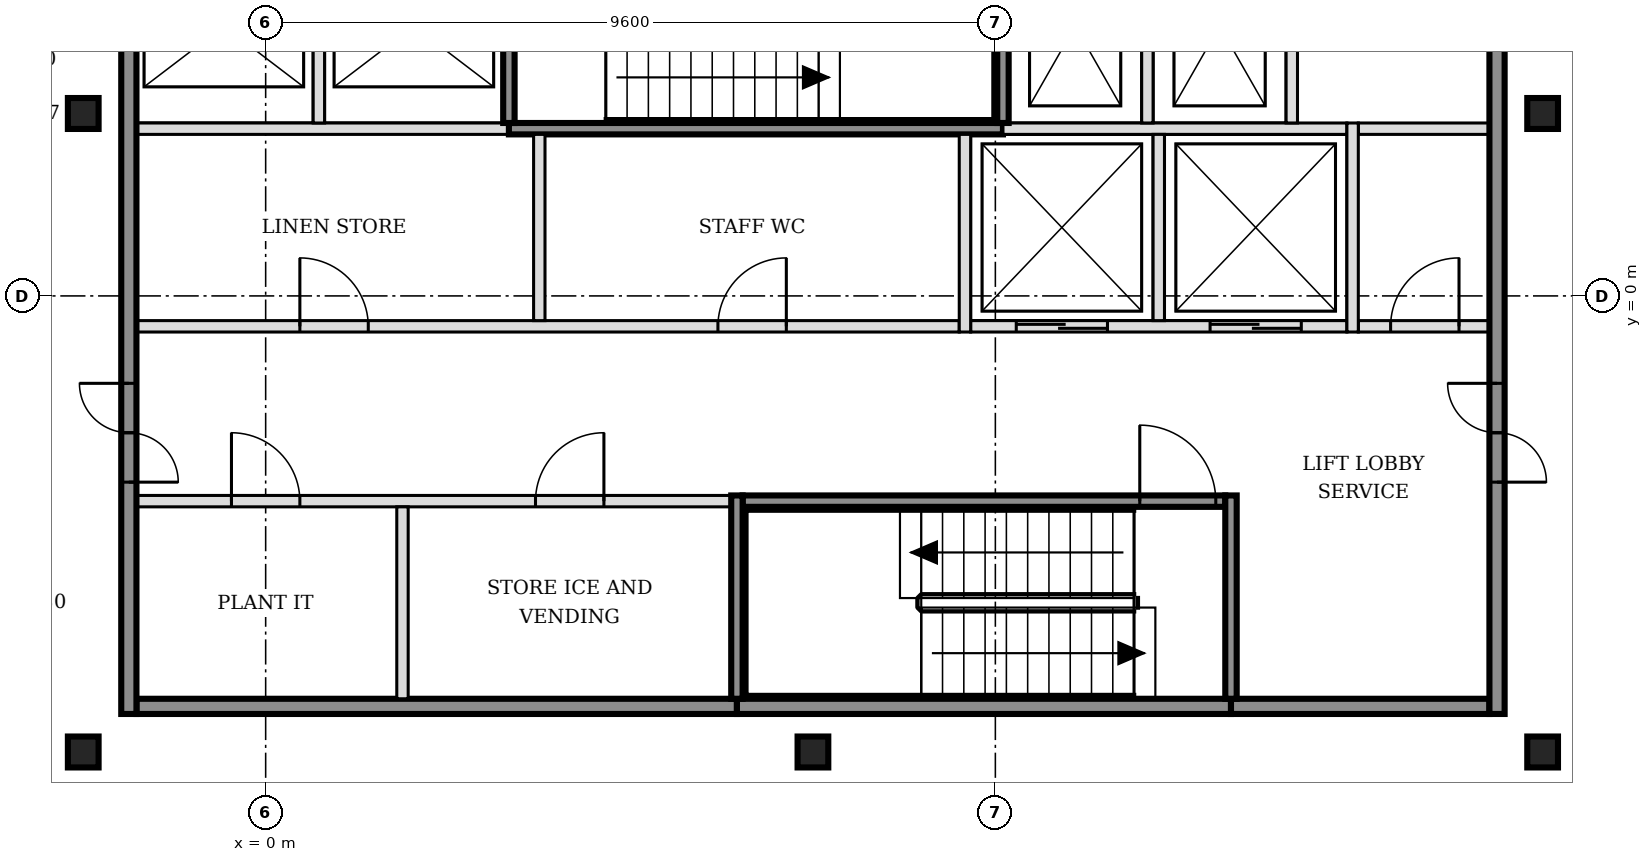
"""IFC4 building model, lengths in metres.
Left out: names, types, materials, properties, quantities, classifications, styles, units other than length and angle.
Written with IfcOpenShell. Run it as: python <this file> out.ifc"""

import sys

from ifc_helpers import new_model, si_unit, direction, frame, frame_2d, origin, origin_2d, place, context, subcontext, project, spatial, rectangle, i_section, extrude, element, fill, save


model = new_model("IFC4")
c1 = context("Model", 3, precision=1e-05, world=origin(), true_north=direction((0.0, 1.0)))
c2 = subcontext(c1, "Body", "Model", "MODEL_VIEW")
j1 = project(units=[si_unit("LENGTHUNIT", "METRE"), si_unit("PLANEANGLEUNIT", "RADIAN")], contexts=[c1])
p1 = place(None, origin())
s1 = spatial("IfcSite", under=j1, at=p1, CompositionType="ELEMENT")
p2 = place(p1, origin())
s2 = spatial("IfcBuilding", under=s1, at=p2, CompositionType="ELEMENT")
p3 = place(p2, frame((0.0, 0.0, 210.6)))
s3 = spatial("IfcBuildingStorey", under=s2, at=p3, CompositionType="ELEMENT", Elevation=210.6)
for number, where, z_axis, x_axis in (
    (1, (-2.4, -6.0, -0.15), (0.0, 0.0, 1.0), (1.0, 0.0, 0.0)),
    (2, (7.2, -6.0, -0.15), (0.0, 0.0, 1.0), (1.0, 0.0, 0.0)),
    (3, (16.8, -6.0, -0.15), (0.0, 0.0, 1.0), (1.0, 0.0, 0.0)),
    (4, (-2.4, 2.4, -0.15), (0.0, 0.0, 1.0), (1.0, 0.0, 0.0)),
    (5, (16.8, 2.4, -0.15), (0.0, 0.0, 1.0), (1.0, 0.0, 0.0)),
):
    element("IfcColumn", number, at=place(p3, frame(where, z_axis=z_axis, x_axis=x_axis)), inside=s3, PredefinedType="COLUMN", context=c2, shape_type="SweptSolid", body=[
        extrude(i_section(OverallWidth=0.404, OverallDepth=0.407, WebThickness=0.027, FlangeThickness=0.044, FilletRadius=0.015, at=origin_2d()), origin(), (0.0, 0.0, 1.0), 3.6),
    ])
p4 = place(p3, frame((-1.7, -5.4, 0.0), z_axis=(0.0, 0.0, 1.0), x_axis=(1.0, 0.0, 0.0)))
e6 = element("IfcWall", 6, at=p4, inside=s3, PredefinedType="SOLIDWALL", context=c2, shape_type="SweptSolid", body=[
    extrude(rectangle(XDim=7.9, YDim=0.2, at=frame_2d((3.95, 0.0))), origin(), (0.0, 0.0, 1.0), 3.45),
])
p5 = place(p3, frame((6.2, -5.4, 0.0), z_axis=(0.0, 0.0, 1.0), x_axis=(1.0, 0.0, 0.0)))
e7 = element("IfcWall", 7, at=p5, inside=s3, PredefinedType="SOLIDWALL", context=c2, shape_type="SweptSolid", body=[
    extrude(rectangle(XDim=6.5, YDim=0.2, at=frame_2d((3.25, 0.0))), origin(), (0.0, 0.0, 1.0), 3.45),
])
p6 = place(p3, frame((12.7, -5.4, 0.0), z_axis=(0.0, 0.0, 1.0), x_axis=(1.0, 0.0, 0.0)))
e8 = element("IfcWall", 8, at=p6, inside=s3, PredefinedType="SOLIDWALL", context=c2, shape_type="SweptSolid", body=[
    extrude(rectangle(XDim=3.4, YDim=0.2, at=frame_2d((1.7, 0.0))), origin(), (0.0, 0.0, 1.0), 3.45),
])
p7 = place(p3, frame((-1.7, -2.7, 0.0), z_axis=(0.0, 0.0, 1.0), x_axis=(1.0, 0.0, 0.0)))
e9 = element("IfcWall", 9, at=p7, inside=s3, PredefinedType="PARTITIONING", context=c2, shape_type="SweptSolid", body=[
    extrude(rectangle(XDim=7.825, YDim=0.15, at=frame_2d((3.913, 0.0))), origin(), (0.0, 0.0, 1.0), 3.45),
])
p8 = place(p7, frame((1.25, 0.0, 0.0)))
e10 = element("IfcOpeningElement", 10, at=p8, cuts=e9, PredefinedType="OPENING", context=c2, shape_type="SweptSolid", body=[
    extrude(rectangle(XDim=0.9, YDim=2.1, at=frame_2d((0.45, 1.05))), frame((0.0, 0.085, 0.0), z_axis=(0.0, -1.0, 0.0), x_axis=(1.0, 0.0, 0.0)), (0.0, 0.0, 1.0), 0.17),
])
p9 = place(p7, frame((5.25, 0.0, 0.0)))
e11 = element("IfcOpeningElement", 11, at=p9, cuts=e9, PredefinedType="OPENING", context=c2, shape_type="SweptSolid", body=[
    extrude(rectangle(XDim=0.9, YDim=2.1, at=frame_2d((0.45, 1.05))), frame((0.0, 0.085, 0.0), z_axis=(0.0, -1.0, 0.0), x_axis=(1.0, 0.0, 0.0)), (0.0, 0.0, 1.0), 0.17),
])
p10 = place(p3, frame((6.275, -2.7, 0.0), z_axis=(0.0, 0.0, 1.0), x_axis=(1.0, 0.0, 0.0)))
e12 = element("IfcWall", 12, at=p10, inside=s3, PredefinedType="SOLIDWALL", context=c2, shape_type="SweptSolid", body=[
    extrude(rectangle(XDim=6.35, YDim=0.15, at=frame_2d((3.175, 0.0))), origin(), (0.0, 0.0, 1.0), 3.45),
])
p11 = place(p10, frame((5.225, 0.0, 0.0)))
e13 = element("IfcOpeningElement", 13, at=p11, cuts=e12, PredefinedType="OPENING", context=c2, shape_type="SweptSolid", body=[
    extrude(rectangle(XDim=1.0, YDim=2.1, at=frame_2d((0.5, 1.05))), frame((0.0, 0.085, 0.0), z_axis=(0.0, -1.0, 0.0), x_axis=(1.0, 0.0, 0.0)), (0.0, 0.0, 1.0), 0.17),
])
p12 = place(p3, frame((-1.7, -0.4, 0.0), z_axis=(0.0, 0.0, 1.0), x_axis=(1.0, 0.0, 0.0)))
e14 = element("IfcWall", 14, at=p12, inside=s3, PredefinedType="PARTITIONING", context=c2, shape_type="SweptSolid", body=[
    extrude(rectangle(XDim=10.825, YDim=0.15, at=frame_2d((5.413, 0.0))), origin(), (0.0, 0.0, 1.0), 3.45),
])
p13 = place(p12, frame((2.15, 0.0, 0.0)))
e15 = element("IfcOpeningElement", 15, at=p13, cuts=e14, PredefinedType="OPENING", context=c2, shape_type="SweptSolid", body=[
    extrude(rectangle(XDim=0.9, YDim=2.1, at=frame_2d((0.45, 1.05))), frame((0.0, 0.085, 0.0), z_axis=(0.0, -1.0, 0.0), x_axis=(1.0, 0.0, 0.0)), (0.0, 0.0, 1.0), 0.17),
])
p14 = place(p12, frame((7.65, 0.0, 0.0)))
e16 = element("IfcOpeningElement", 16, at=p14, cuts=e14, PredefinedType="OPENING", context=c2, shape_type="SweptSolid", body=[
    extrude(rectangle(XDim=0.9, YDim=2.1, at=frame_2d((0.45, 1.05))), frame((0.0, 0.085, 0.0), z_axis=(0.0, -1.0, 0.0), x_axis=(1.0, 0.0, 0.0)), (0.0, 0.0, 1.0), 0.17),
])
p15 = place(p3, frame((9.275, -0.4, 0.0), z_axis=(0.0, 0.0, 1.0), x_axis=(1.0, 0.0, 0.0)))
e17 = element("IfcWall", 17, at=p15, inside=s3, PredefinedType="SOLIDWALL", context=c2, shape_type="SweptSolid", body=[
    extrude(rectangle(XDim=4.95, YDim=0.15, at=frame_2d((2.475, 0.0))), origin(), (0.0, 0.0, 1.0), 3.45),
])
p16 = place(p15, frame((0.6, 0.0, 0.0)))
e18 = element("IfcOpeningElement", 18, at=p16, cuts=e17, PredefinedType="OPENING", context=c2, shape_type="SweptSolid", body=[
    extrude(rectangle(XDim=1.2, YDim=2.1, at=frame_2d((0.6, 1.05))), frame((0.0, 0.085, 0.0), z_axis=(0.0, -1.0, 0.0), x_axis=(1.0, 0.0, 0.0)), (0.0, 0.0, 1.0), 0.17),
])
p17 = place(p15, frame((3.15, 0.0, 0.0)))
e19 = element("IfcOpeningElement", 19, at=p17, cuts=e17, PredefinedType="OPENING", context=c2, shape_type="SweptSolid", body=[
    extrude(rectangle(XDim=1.2, YDim=2.1, at=frame_2d((0.6, 1.05))), frame((0.0, 0.085, 0.0), z_axis=(0.0, -1.0, 0.0), x_axis=(1.0, 0.0, 0.0)), (0.0, 0.0, 1.0), 0.17),
])
p18 = place(p3, frame((14.375, -0.4, 0.0), z_axis=(0.0, 0.0, 1.0), x_axis=(1.0, 0.0, 0.0)))
e20 = element("IfcWall", 20, at=p18, inside=s3, PredefinedType="PARTITIONING", context=c2, shape_type="SweptSolid", body=[
    extrude(rectangle(XDim=1.725, YDim=0.15, at=frame_2d((0.863, 0.0))), origin(), (0.0, 0.0, 1.0), 3.45),
])
p19 = place(p18, frame((0.425, 0.0, 0.0)))
e21 = element("IfcOpeningElement", 21, at=p19, cuts=e20, PredefinedType="OPENING", context=c2, shape_type="SweptSolid", body=[
    extrude(rectangle(XDim=0.9, YDim=2.1, at=frame_2d((0.45, 1.05))), frame((0.0, 0.085, 0.0), z_axis=(0.0, -1.0, 0.0), x_axis=(1.0, 0.0, 0.0)), (0.0, 0.0, 1.0), 0.17),
])
p20 = place(p3, frame((-1.7, 2.2, 0.0), z_axis=(0.0, 0.0, 1.0), x_axis=(1.0, 0.0, 0.0)))
e22 = element("IfcWall", 22, at=p20, inside=s3, PredefinedType="SOLIDWALL", context=c2, shape_type="SweptSolid", body=[
    extrude(rectangle(XDim=4.9, YDim=0.15, at=frame_2d((2.45, 0.0))), origin(), (0.0, 0.0, 1.0), 3.45),
])
p21 = place(p3, frame((3.2, 2.2, 0.0), z_axis=(0.0, 0.0, 1.0), x_axis=(1.0, 0.0, 0.0)))
e23 = element("IfcWall", 23, at=p21, inside=s3, PredefinedType="SOLIDWALL", context=c2, shape_type="SweptSolid", body=[
    extrude(rectangle(XDim=6.5, YDim=0.15, at=frame_2d((3.25, 0.0))), origin(), (0.0, 0.0, 1.0), 3.45),
])
p22 = place(p3, frame((9.7, 2.2, 0.0), z_axis=(0.0, 0.0, 1.0), x_axis=(1.0, 0.0, 0.0)))
e24 = element("IfcWall", 24, at=p22, inside=s3, PredefinedType="SOLIDWALL", context=c2, shape_type="SweptSolid", body=[
    extrude(rectangle(XDim=4.525, YDim=0.15, at=frame_2d((2.263, 0.0))), origin(), (0.0, 0.0, 1.0), 3.45),
])
p23 = place(p3, frame((14.375, 2.2, 0.0), z_axis=(0.0, 0.0, 1.0), x_axis=(1.0, 0.0, 0.0)))
e25 = element("IfcWall", 25, at=p23, inside=s3, PredefinedType="PARTITIONING", context=c2, shape_type="SweptSolid", body=[
    extrude(rectangle(XDim=1.725, YDim=0.15, at=frame_2d((0.863, 0.0))), origin(), (0.0, 0.0, 1.0), 3.45),
])
p24 = place(p3, frame((-1.8, -5.5, 0.0), z_axis=(0.0, 0.0, 1.0), x_axis=(0.0, 1.0, 0.0)))
e26 = element("IfcWall", 26, at=p24, inside=s3, PredefinedType="SOLIDWALL", context=c2, shape_type="SweptSolid", body=[
    extrude(rectangle(XDim=15.8, YDim=0.2, at=frame_2d((7.9, 0.0))), origin(), (0.0, 0.0, 1.0), 3.45),
])
p25 = place(p24, frame((3.05, 0.0, 0.0)))
e27 = element("IfcOpeningElement", 27, at=p25, cuts=e26, PredefinedType="OPENING", context=c2, shape_type="SweptSolid", body=[
    extrude(rectangle(XDim=1.3, YDim=2.1, at=frame_2d((0.65, 1.05))), frame((0.0, 0.11, 0.0), z_axis=(0.0, -1.0, 0.0), x_axis=(1.0, 0.0, 0.0)), (0.0, 0.0, 1.0), 0.22),
])
p26 = place(p24, frame((11.45, 0.0, 0.0)))
e28 = element("IfcOpeningElement", 28, at=p26, cuts=e26, PredefinedType="OPENING", context=c2, shape_type="SweptSolid", body=[
    extrude(rectangle(XDim=1.3, YDim=2.1, at=frame_2d((0.65, 1.05))), frame((0.0, 0.11, 0.0), z_axis=(0.0, -1.0, 0.0), x_axis=(1.0, 0.0, 0.0)), (0.0, 0.0, 1.0), 0.22),
])
p27 = place(p3, frame((0.7, 2.275, 0.0), z_axis=(0.0, 0.0, 1.0), x_axis=(0.0, 1.0, 0.0)))
e29 = element("IfcWall", 29, at=p27, inside=s3, PredefinedType="SOLIDWALL", context=c2, shape_type="SweptSolid", body=[
    extrude(rectangle(XDim=2.55, YDim=0.15, at=frame_2d((1.275, 0.0))), origin(), (0.0, 0.0, 1.0), 3.45),
])
p28 = place(p3, frame((1.8, -5.3, 0.0), z_axis=(0.0, 0.0, 1.0), x_axis=(0.0, 1.0, 0.0)))
e30 = element("IfcWall", 30, at=p28, inside=s3, PredefinedType="PARTITIONING", context=c2, shape_type="SweptSolid", body=[
    extrude(rectangle(XDim=2.525, YDim=0.15, at=frame_2d((1.263, 0.0))), origin(), (0.0, 0.0, 1.0), 3.45),
])
p29 = place(p3, frame((3.2, 2.275, 0.0), z_axis=(0.0, 0.0, 1.0), x_axis=(0.0, 1.0, 0.0)))
e31 = element("IfcWall", 31, at=p29, inside=s3, PredefinedType="SOLIDWALL", context=c2, shape_type="SweptSolid", body=[
    extrude(rectangle(XDim=2.55, YDim=0.15, at=frame_2d((1.275, 0.0))), origin(), (0.0, 0.0, 1.0), 3.45),
])
p30 = place(p3, frame((3.6, -0.325, 0.0), z_axis=(0.0, 0.0, 1.0), x_axis=(0.0, 1.0, 0.0)))
e32 = element("IfcWall", 32, at=p30, inside=s3, PredefinedType="PARTITIONING", context=c2, shape_type="SweptSolid", body=[
    extrude(rectangle(XDim=2.45, YDim=0.15, at=frame_2d((1.225, 0.0))), origin(), (0.0, 0.0, 1.0), 3.45),
])
p31 = place(p3, frame((6.2, -5.3, 0.0), z_axis=(0.0, 0.0, 1.0), x_axis=(0.0, 1.0, 0.0)))
e33 = element("IfcWall", 33, at=p31, inside=s3, PredefinedType="SOLIDWALL", context=c2, shape_type="SweptSolid", body=[
    extrude(rectangle(XDim=2.675, YDim=0.15, at=frame_2d((1.337, 0.0))), origin(), (0.0, 0.0, 1.0), 3.45),
])
p32 = place(p3, frame((9.2, -0.475, 0.0), z_axis=(0.0, 0.0, 1.0), x_axis=(0.0, 1.0, 0.0)))
e34 = element("IfcWall", 34, at=p32, inside=s3, PredefinedType="SOLIDWALL", context=c2, shape_type="SweptSolid", body=[
    extrude(rectangle(XDim=2.6, YDim=0.15, at=frame_2d((1.3, 0.0))), origin(), (0.0, 0.0, 1.0), 3.45),
])
for number, where, z_axis, x_axis in (
    (35, (9.7, 2.275, 0.0), (0.0, 0.0, 1.0), (0.0, 1.0, 0.0)),
    (36, (11.6, 2.275, 0.0), (0.0, 0.0, 1.0), (0.0, 1.0, 0.0)),
):
    element("IfcWall", number, at=place(p3, frame(where, z_axis=z_axis, x_axis=x_axis)), inside=s3, PredefinedType="SOLIDWALL", context=c2, shape_type="SweptSolid", body=[
        extrude(rectangle(XDim=2.55, YDim=0.15, at=frame_2d((1.275, 0.0))), origin(), (0.0, 0.0, 1.0), 3.45),
    ])
p33 = place(p3, frame((11.75, -0.325, 0.0), z_axis=(0.0, 0.0, 1.0), x_axis=(0.0, 1.0, 0.0)))
e37 = element("IfcWall", 37, at=p33, inside=s3, PredefinedType="SOLIDWALL", context=c2, shape_type="SweptSolid", body=[
    extrude(rectangle(XDim=2.45, YDim=0.15, at=frame_2d((1.225, 0.0))), origin(), (0.0, 0.0, 1.0), 3.45),
])
p34 = place(p3, frame((12.7, -5.3, 0.0), z_axis=(0.0, 0.0, 1.0), x_axis=(0.0, 1.0, 0.0)))
e38 = element("IfcWall", 38, at=p34, inside=s3, PredefinedType="SOLIDWALL", context=c2, shape_type="SweptSolid", body=[
    extrude(rectangle(XDim=2.675, YDim=0.15, at=frame_2d((1.337, 0.0))), origin(), (0.0, 0.0, 1.0), 3.45),
])
p35 = place(p3, frame((13.5, 2.275, 0.0), z_axis=(0.0, 0.0, 1.0), x_axis=(0.0, 1.0, 0.0)))
e39 = element("IfcWall", 39, at=p35, inside=s3, PredefinedType="SOLIDWALL", context=c2, shape_type="SweptSolid", body=[
    extrude(rectangle(XDim=2.55, YDim=0.15, at=frame_2d((1.275, 0.0))), origin(), (0.0, 0.0, 1.0), 3.45),
])
p36 = place(p3, frame((14.3, -0.475, 0.0), z_axis=(0.0, 0.0, 1.0), x_axis=(0.0, 1.0, 0.0)))
e40 = element("IfcWall", 40, at=p36, inside=s3, PredefinedType="SOLIDWALL", context=c2, shape_type="SweptSolid", body=[
    extrude(rectangle(XDim=2.75, YDim=0.15, at=frame_2d((1.375, 0.0))), origin(), (0.0, 0.0, 1.0), 3.45),
])
p37 = place(p3, frame((16.2, -5.5, 0.0), z_axis=(0.0, 0.0, 1.0), x_axis=(0.0, 1.0, 0.0)))
e41 = element("IfcWall", 41, at=p37, inside=s3, PredefinedType="SOLIDWALL", context=c2, shape_type="SweptSolid", body=[
    extrude(rectangle(XDim=15.8, YDim=0.2, at=frame_2d((7.9, 0.0))), origin(), (0.0, 0.0, 1.0), 3.45),
])
p38 = place(p37, frame((3.05, 0.0, 0.0)))
e42 = element("IfcOpeningElement", 42, at=p38, cuts=e41, PredefinedType="OPENING", context=c2, shape_type="SweptSolid", body=[
    extrude(rectangle(XDim=1.3, YDim=2.1, at=frame_2d((0.65, 1.05))), frame((0.0, 0.11, 0.0), z_axis=(0.0, -1.0, 0.0), x_axis=(1.0, 0.0, 0.0)), (0.0, 0.0, 1.0), 0.22),
])
p39 = place(p37, frame((11.45, 0.0, 0.0)))
e43 = element("IfcOpeningElement", 43, at=p39, cuts=e41, PredefinedType="OPENING", context=c2, shape_type="SweptSolid", body=[
    extrude(rectangle(XDim=1.3, YDim=2.1, at=frame_2d((0.65, 1.05))), frame((0.0, 0.11, 0.0), z_axis=(0.0, -1.0, 0.0), x_axis=(1.0, 0.0, 0.0)), (0.0, 0.0, 1.0), 0.22),
])
p40 = place(p16, origin())
e44 = element("IfcDoor", 44, at=p40, inside=s3, OperationType="DOUBLE_DOOR_SLIDING", PredefinedType="DOOR", context=c2, shape_type="SweptSolid", body=[
    extrude(rectangle(XDim=1.2, YDim=2.1, at=frame_2d((0.6, 1.05))), frame((0.0, 0.025, 0.0), z_axis=(0.0, -1.0, 0.0), x_axis=(1.0, 0.0, 0.0)), (0.0, 0.0, 1.0), 0.05),
])
fill(e18, e44)
p41 = place(p17, origin())
e45 = element("IfcDoor", 45, at=p41, inside=s3, OperationType="DOUBLE_DOOR_SLIDING", PredefinedType="DOOR", context=c2, shape_type="SweptSolid", body=[
    extrude(rectangle(XDim=1.2, YDim=2.1, at=frame_2d((0.6, 1.05))), frame((0.0, 0.025, 0.0), z_axis=(0.0, -1.0, 0.0), x_axis=(1.0, 0.0, 0.0)), (0.0, 0.0, 1.0), 0.05),
])
fill(e19, e45)
p42 = place(p11, origin())
e46 = element("IfcDoor", 46, at=p42, inside=s3, OperationType="SINGLE_SWING_LEFT", PredefinedType="DOOR", context=c2, shape_type="SweptSolid", body=[
    extrude(rectangle(XDim=1.0, YDim=2.1, at=frame_2d((0.5, 1.05))), frame((0.0, 0.025, 0.0), z_axis=(0.0, -1.0, 0.0), x_axis=(1.0, 0.0, 0.0)), (0.0, 0.0, 1.0), 0.05),
])
fill(e13, e46)
p43 = place(p25, origin())
e47 = element("IfcDoor", 47, at=p43, inside=s3, OperationType="DOUBLE_DOOR_SINGLE_SWING", PredefinedType="DOOR", context=c2, shape_type="SweptSolid", body=[
    extrude(rectangle(XDim=1.3, YDim=2.1, at=frame_2d((0.65, 1.05))), frame((0.0, 0.025, 0.0), z_axis=(0.0, -1.0, 0.0), x_axis=(1.0, 0.0, 0.0)), (0.0, 0.0, 1.0), 0.05),
])
fill(e27, e47)
p44 = place(p38, origin())
e48 = element("IfcDoor", 48, at=p44, inside=s3, OperationType="DOUBLE_DOOR_SINGLE_SWING", PredefinedType="DOOR", context=c2, shape_type="SweptSolid", body=[
    extrude(rectangle(XDim=1.3, YDim=2.1, at=frame_2d((0.65, 1.05))), frame((0.0, 0.025, 0.0), z_axis=(0.0, -1.0, 0.0), x_axis=(1.0, 0.0, 0.0)), (0.0, 0.0, 1.0), 0.05),
])
fill(e42, e48)
p45 = place(p19, origin())
e49 = element("IfcDoor", 49, at=p45, inside=s3, OperationType="SINGLE_SWING_RIGHT", PredefinedType="DOOR", context=c2, shape_type="SweptSolid", body=[
    extrude(rectangle(XDim=0.9, YDim=2.1, at=frame_2d((0.45, 1.05))), frame((0.0, 0.025, 0.0), z_axis=(0.0, -1.0, 0.0), x_axis=(1.0, 0.0, 0.0)), (0.0, 0.0, 1.0), 0.05),
])
fill(e21, e49)
p46 = place(p8, origin())
e50 = element("IfcDoor", 50, at=p46, inside=s3, OperationType="SINGLE_SWING_LEFT", PredefinedType="DOOR", context=c2, shape_type="SweptSolid", body=[
    extrude(rectangle(XDim=0.9, YDim=2.1, at=frame_2d((0.45, 1.05))), frame((0.0, 0.025, 0.0), z_axis=(0.0, -1.0, 0.0), x_axis=(1.0, 0.0, 0.0)), (0.0, 0.0, 1.0), 0.05),
])
fill(e10, e50)
p47 = place(p9, origin())
e51 = element("IfcDoor", 51, at=p47, inside=s3, OperationType="SINGLE_SWING_RIGHT", PredefinedType="DOOR", context=c2, shape_type="SweptSolid", body=[
    extrude(rectangle(XDim=0.9, YDim=2.1, at=frame_2d((0.45, 1.05))), frame((0.0, 0.025, 0.0), z_axis=(0.0, -1.0, 0.0), x_axis=(1.0, 0.0, 0.0)), (0.0, 0.0, 1.0), 0.05),
])
fill(e11, e51)
p48 = place(p13, origin())
e52 = element("IfcDoor", 52, at=p48, inside=s3, OperationType="SINGLE_SWING_LEFT", PredefinedType="DOOR", context=c2, shape_type="SweptSolid", body=[
    extrude(rectangle(XDim=0.9, YDim=2.1, at=frame_2d((0.45, 1.05))), frame((0.0, 0.025, 0.0), z_axis=(0.0, -1.0, 0.0), x_axis=(1.0, 0.0, 0.0)), (0.0, 0.0, 1.0), 0.05),
])
fill(e15, e52)
p49 = place(p14, origin())
e53 = element("IfcDoor", 53, at=p49, inside=s3, OperationType="SINGLE_SWING_RIGHT", PredefinedType="DOOR", context=c2, shape_type="SweptSolid", body=[
    extrude(rectangle(XDim=0.9, YDim=2.1, at=frame_2d((0.45, 1.05))), frame((0.0, 0.025, 0.0), z_axis=(0.0, -1.0, 0.0), x_axis=(1.0, 0.0, 0.0)), (0.0, 0.0, 1.0), 0.05),
])
fill(e16, e53)
save(model, sys.argv[1])
